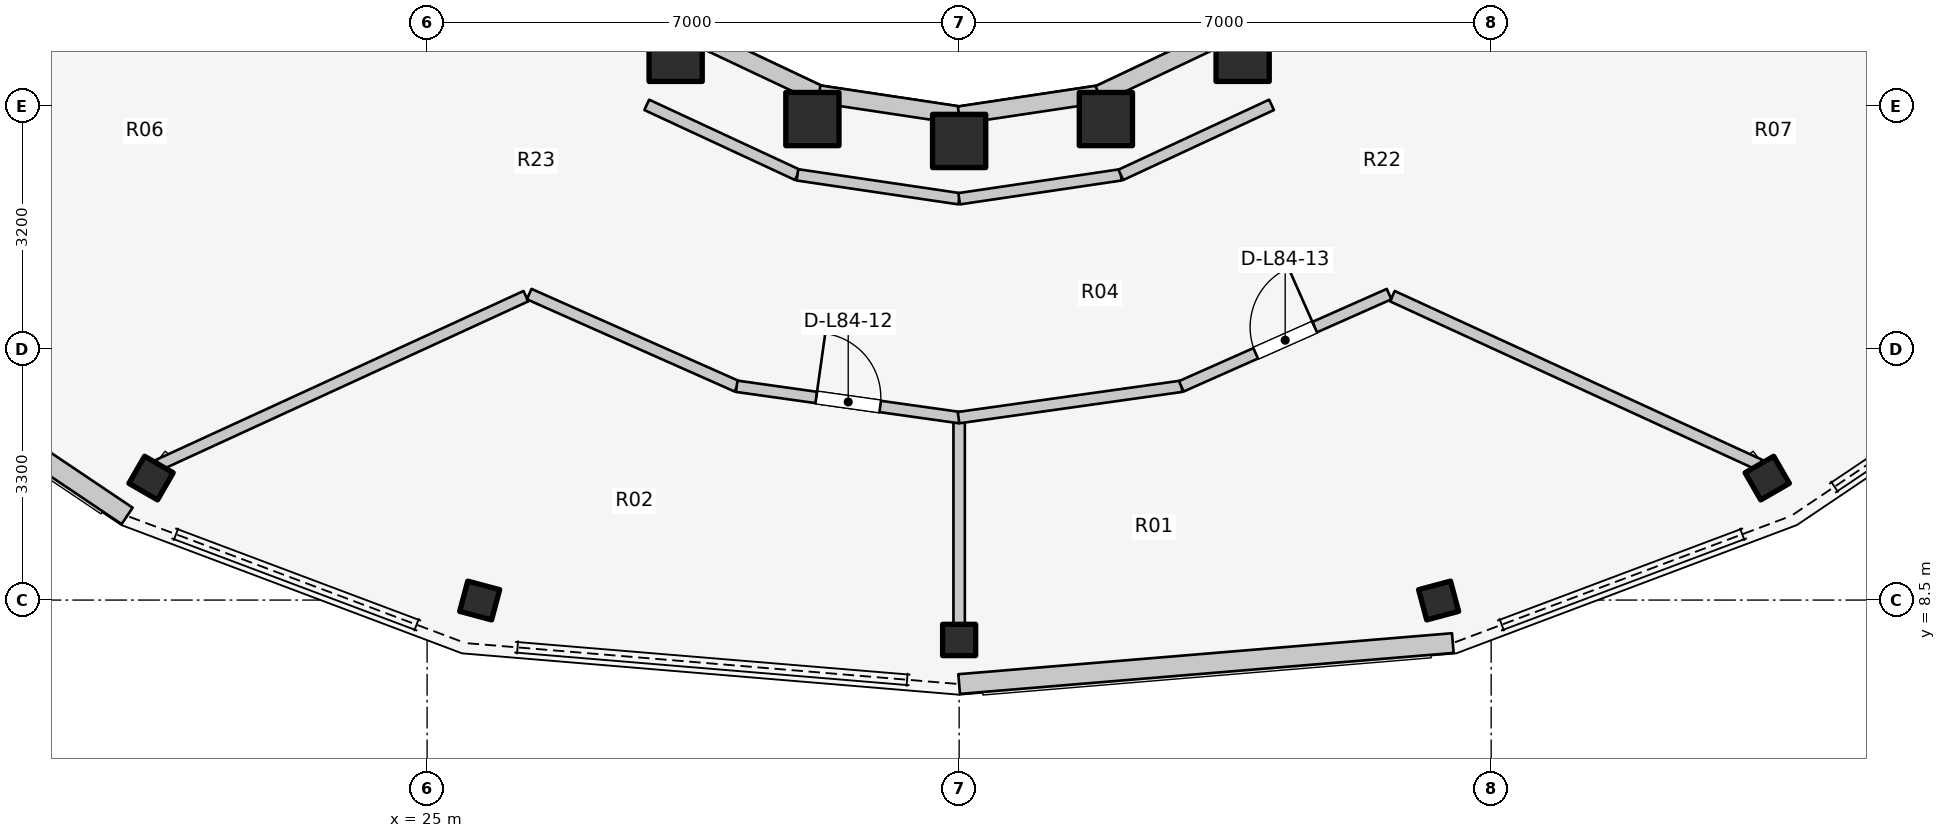
"""IFC4 building model, lengths in metres.
Left out: names, types, materials, properties, quantities, classifications, styles, units other than length and angle.
Written with IfcOpenShell. Run it as: python <this file> out.ifc"""

import sys

from ifc_helpers import new_model, si_unit, direction, frame, frame_2d, origin, origin_2d, place, context, subcontext, project, spatial, rectangle, i_section, extrude, element, fill, save


model = new_model("IFC4")
c1 = context("Model", 3, precision=1e-05, world=origin(), true_north=direction((0.0, 1.0)))
c2 = subcontext(c1, "Body", "Model", "MODEL_VIEW")
j1 = project(units=[si_unit("LENGTHUNIT", "METRE"), si_unit("PLANEANGLEUNIT", "RADIAN")], contexts=[c1])
p1 = place(None, origin())
s1 = spatial("IfcSite", under=j1, at=p1, CompositionType="ELEMENT")
p2 = place(p1, origin())
s2 = spatial("IfcBuilding", under=s1, at=p2, CompositionType="ELEMENT")
p3 = place(p2, frame((0.0, 0.0, 276.4)))
s3 = spatial("IfcBuildingStorey", under=s2, at=p3, CompositionType="ELEMENT", Elevation=276.4)
p4 = place(p3, frame((28.27, 15.673, 0.0), z_axis=(0.0, 0.0, 1.0), x_axis=(1.0, 0.0, 0.0)))
e1 = element("IfcColumn", 1, at=p4, inside=s3, PredefinedType="COLUMN", context=c2, shape_type="SweptSolid", body=[
    extrude(rectangle(XDim=0.7, YDim=0.7, at=origin_2d()), origin(), (0.0, 0.0, 1.0), 3.2),
])
p5 = place(p3, frame((21.368, 10.105, 0.0), z_axis=(0.0, 0.0, 1.0), x_axis=(-0.5, -0.866025403784, 0.0)))
e2 = element("IfcColumn", 2, at=p5, inside=s3, PredefinedType="COLUMN", context=c2, shape_type="SweptSolid", body=[
    extrude(i_section(OverallWidth=0.412, OverallDepth=0.435, WebThickness=0.036, FlangeThickness=0.057, FilletRadius=0.025, at=origin_2d()), origin(), (0.0, 0.0, 1.0), 3.2),
])
p6 = place(p3, frame((30.069, 14.828, 0.0), z_axis=(0.0, 0.0, 1.0), x_axis=(1.0, 0.0, 0.0)))
e3 = element("IfcColumn", 3, at=p6, inside=s3, PredefinedType="COLUMN", context=c2, shape_type="SweptSolid", body=[
    extrude(rectangle(XDim=0.7, YDim=0.7, at=origin_2d()), origin(), (0.0, 0.0, 1.0), 3.2),
])
p7 = place(p3, frame((25.692, 8.494, 0.0), z_axis=(0.0, 0.0, 1.0), x_axis=(-0.258819045103, -0.965925826289, 0.0)))
e4 = element("IfcColumn", 4, at=p7, inside=s3, PredefinedType="COLUMN", context=c2, shape_type="SweptSolid", body=[
    extrude(i_section(OverallWidth=0.412, OverallDepth=0.435, WebThickness=0.036, FlangeThickness=0.057, FilletRadius=0.025, at=origin_2d()), origin(), (0.0, 0.0, 1.0), 3.2),
])
p8 = place(p3, frame((32.0, 14.54, 0.0), z_axis=(0.0, 0.0, 1.0), x_axis=(1.0, 0.0, 0.0)))
e5 = element("IfcColumn", 5, at=p8, inside=s3, PredefinedType="COLUMN", context=c2, shape_type="SweptSolid", body=[
    extrude(rectangle(XDim=0.7, YDim=0.7, at=origin_2d()), origin(), (0.0, 0.0, 1.0), 3.2),
])
p9 = place(p3, frame((32.0, 7.975, 0.0), z_axis=(0.0, 0.0, 1.0), x_axis=(0.0, -1.0, 0.0)))
e6 = element("IfcColumn", 6, at=p9, inside=s3, PredefinedType="COLUMN", context=c2, shape_type="SweptSolid", body=[
    extrude(i_section(OverallWidth=0.412, OverallDepth=0.435, WebThickness=0.036, FlangeThickness=0.057, FilletRadius=0.025, at=origin_2d()), origin(), (0.0, 0.0, 1.0), 3.2),
])
p10 = place(p3, frame((33.931, 14.828, 0.0), z_axis=(0.0, 0.0, 1.0), x_axis=(1.0, 0.0, 0.0)))
e7 = element("IfcColumn", 7, at=p10, inside=s3, PredefinedType="COLUMN", context=c2, shape_type="SweptSolid", body=[
    extrude(rectangle(XDim=0.7, YDim=0.7, at=origin_2d()), origin(), (0.0, 0.0, 1.0), 3.2),
])
p11 = place(p3, frame((38.308, 8.494, 0.0), z_axis=(0.0, 0.0, 1.0), x_axis=(0.258819045103, -0.965925826289, 0.0)))
e8 = element("IfcColumn", 8, at=p11, inside=s3, PredefinedType="COLUMN", context=c2, shape_type="SweptSolid", body=[
    extrude(i_section(OverallWidth=0.412, OverallDepth=0.435, WebThickness=0.036, FlangeThickness=0.057, FilletRadius=0.025, at=origin_2d()), origin(), (0.0, 0.0, 1.0), 3.2),
])
p12 = place(p3, frame((35.73, 15.673, 0.0), z_axis=(0.0, 0.0, 1.0), x_axis=(1.0, 0.0, 0.0)))
e9 = element("IfcColumn", 9, at=p12, inside=s3, PredefinedType="COLUMN", context=c2, shape_type="SweptSolid", body=[
    extrude(rectangle(XDim=0.7, YDim=0.7, at=origin_2d()), origin(), (0.0, 0.0, 1.0), 3.2),
])
p13 = place(p3, frame((42.632, 10.105, 0.0), z_axis=(0.0, 0.0, 1.0), x_axis=(0.5, -0.866025403784, 0.0)))
e10 = element("IfcColumn", 10, at=p13, inside=s3, PredefinedType="COLUMN", context=c2, shape_type="SweptSolid", body=[
    extrude(i_section(OverallWidth=0.412, OverallDepth=0.435, WebThickness=0.036, FlangeThickness=0.057, FilletRadius=0.025, at=origin_2d()), origin(), (0.0, 0.0, 1.0), 3.2),
])
p14 = place(p3, frame((28.44, 15.968, 0.0), z_axis=(0.0, 0.0, 1.0), x_axis=(0.904179699603, -0.427152280606, 0.0)))
e11 = element("IfcWall", 11, at=p14, inside=s3, PredefinedType="STANDARD", context=c2, shape_type="SweptSolid", body=[
    extrude(rectangle(XDim=1.899, YDim=0.23, at=frame_2d((0.95, 0.0))), origin(), (0.0, 0.0, 1.0), 2.23),
])
for number, where, z_axis, x_axis in (
    (12, (30.157, 15.157, 0.0), (0.0, 0.0, 1.0), (0.989, -0.149, 0.0)),
    (13, (32.0, 14.88, 0.0), (0.0, 0.0, 1.0), (0.989, 0.149, 0.0)),
):
    element("IfcWall", number, at=place(p3, frame(where, z_axis=z_axis, x_axis=x_axis)), inside=s3, PredefinedType="STANDARD", context=c2, shape_type="SweptSolid", body=[
        extrude(rectangle(XDim=1.864, YDim=0.23, at=frame_2d((0.932, 0.0))), origin(), (0.0, 0.0, 1.0), 2.23),
    ])
p15 = place(p3, frame((33.843, 15.157, 0.0), z_axis=(0.0, 0.0, 1.0), x_axis=(0.904179699603, 0.427152280606, 0.0)))
e14 = element("IfcWall", 14, at=p15, inside=s3, PredefinedType="STANDARD", context=c2, shape_type="SweptSolid", body=[
    extrude(rectangle(XDim=1.899, YDim=0.23, at=frame_2d((0.95, 0.0))), origin(), (0.0, 0.0, 1.0), 2.23),
])
p16 = place(p3, frame((17.652, 11.894, 0.0), z_axis=(0.0, 0.0, 1.0), x_axis=(0.829890129343, -0.557926852929, 0.0)))
e15 = element("IfcWall", 15, at=p16, inside=s3, PredefinedType="STANDARD", context=c2, shape_type="SweptSolid", body=[
    extrude(rectangle(XDim=4.098, YDim=0.26, at=frame_2d((2.049, 0.0))), origin(), (0.0, 0.0, 1.0), 2.95),
])
p17 = place(p3, frame((32.0, 7.395, 0.0), z_axis=(0.0, 0.0, 1.0), x_axis=(0.996573859149, 0.082707576809, 0.0)))
e16 = element("IfcWall", 16, at=p17, inside=s3, PredefinedType="STANDARD", context=c2, shape_type="SweptSolid", body=[
    extrude(rectangle(XDim=6.518, YDim=0.26, at=frame_2d((3.259, 0.0))), origin(), (0.0, 0.0, 1.0), 2.95),
])
p18 = place(p3, frame((27.89, 15.015, 0.0), z_axis=(0.0, 0.0, 1.0), x_axis=(0.906943449489, -0.421252393975, 0.0)))
e17 = element("IfcWall", 17, at=p18, inside=s3, PredefinedType="PARTITIONING", context=c2, shape_type="SweptSolid", body=[
    extrude(rectangle(XDim=2.186, YDim=0.15, at=frame_2d((1.093, 0.0))), origin(), (0.0, 0.0, 1.0), 2.501),
])
for number, where, z_axis, x_axis in (
    (18, (29.873, 14.094, 0.0), (0.0, 0.0, 1.0), (0.989, -0.146, 0.0)),
    (19, (32.0, 13.78, 0.0), (0.0, 0.0, 1.0), (0.989, 0.146, 0.0)),
):
    element("IfcWall", number, at=place(p3, frame(where, z_axis=z_axis, x_axis=x_axis)), inside=s3, PredefinedType="PARTITIONING", context=c2, shape_type="SweptSolid", body=[
        extrude(rectangle(XDim=2.151, YDim=0.15, at=frame_2d((1.075, 0.0))), origin(), (0.0, 0.0, 1.0), 2.501),
    ])
p19 = place(p3, frame((34.127, 14.094, 0.0), z_axis=(0.0, 0.0, 1.0), x_axis=(0.906943449489, 0.421252393975, 0.0)))
e20 = element("IfcWall", 20, at=p19, inside=s3, PredefinedType="PARTITIONING", context=c2, shape_type="SweptSolid", body=[
    extrude(rectangle(XDim=2.186, YDim=0.15, at=frame_2d((1.093, 0.0))), origin(), (0.0, 0.0, 1.0), 2.501),
])
p20 = place(p3, frame((26.3, 12.498, 0.0), z_axis=(0.0, 0.0, 1.0), x_axis=(-0.908705087361, -0.417438695144, 0.0)))
e21 = element("IfcWall", 21, at=p20, inside=s3, PredefinedType="PARTITIONING", context=c2, shape_type="SweptSolid", body=[
    extrude(rectangle(XDim=5.317, YDim=0.15, at=frame_2d((2.659, 0.0))), origin(), (0.0, 0.0, 1.0), 2.455),
])
p21 = place(p3, frame((32.0, 10.845, 0.0), z_axis=(0.0, 0.0, 1.0), x_axis=(0.0, -1.0, 0.0)))
e22 = element("IfcWall", 22, at=p21, inside=s3, PredefinedType="PARTITIONING", context=c2, shape_type="SweptSolid", body=[
    extrude(rectangle(XDim=2.67, YDim=0.15, at=frame_2d((1.335, 0.0))), origin(), (0.0, 0.0, 1.0), 2.501),
])
p22 = place(p3, frame((37.7, 12.498, 0.0), z_axis=(0.0, 0.0, 1.0), x_axis=(0.908705087361, -0.417438695144, 0.0)))
e23 = element("IfcWall", 23, at=p22, inside=s3, PredefinedType="PARTITIONING", context=c2, shape_type="SweptSolid", body=[
    extrude(rectangle(XDim=5.317, YDim=0.15, at=frame_2d((2.659, 0.0))), origin(), (0.0, 0.0, 1.0), 2.455),
])
p23 = place(p3, frame((26.343, 12.525, 0.0), z_axis=(0.0, 0.0, 1.0), x_axis=(0.913989848226, -0.405737054432, 0.0)))
e24 = element("IfcWall", 24, at=p23, inside=s3, PredefinedType="PARTITIONING", context=c2, shape_type="SweptSolid", body=[
    extrude(rectangle(XDim=2.991, YDim=0.15, at=frame_2d((1.496, 0.0))), origin(), (0.0, 0.0, 1.0), 2.455),
])
p24 = place(p3, frame((29.073, 11.313, 0.0), z_axis=(0.0, 0.0, 1.0), x_axis=(0.990247167887, -0.139321737324, 0.0)))
e25 = element("IfcWall", 25, at=p24, inside=s3, PredefinedType="PARTITIONING", context=c2, shape_type="SweptSolid", body=[
    extrude(rectangle(XDim=2.963, YDim=0.15, at=frame_2d((1.481, 0.0))), origin(), (0.0, 0.0, 1.0), 2.455),
])
p25 = place(p24, frame((1.057, 0.0, 0.0)))
e26 = element("IfcOpeningElement", 26, at=p25, cuts=e25, PredefinedType="OPENING", context=c2, shape_type="SweptSolid", body=[
    extrude(rectangle(XDim=0.85, YDim=2.05, at=frame_2d((0.425, 1.025))), frame((0.0, 0.085, 0.0), z_axis=(0.0, -1.0, 0.0), x_axis=(1.0, 0.0, 0.0)), (0.0, 0.0, 1.0), 0.17),
])
p26 = place(p3, frame((31.992, 10.9, 0.0), z_axis=(0.0, 0.0, 1.0), x_axis=(0.990247167887, 0.139321737324, 0.0)))
e27 = element("IfcWall", 27, at=p26, inside=s3, PredefinedType="PARTITIONING", context=c2, shape_type="SweptSolid", body=[
    extrude(rectangle(XDim=2.963, YDim=0.15, at=frame_2d((1.481, 0.0))), origin(), (0.0, 0.0, 1.0), 2.455),
])
p27 = place(p3, frame((34.923, 11.312, 0.0), z_axis=(0.0, 0.0, 1.0), x_axis=(0.913989848226, 0.405737054432, 0.0)))
e28 = element("IfcWall", 28, at=p27, inside=s3, PredefinedType="PARTITIONING", context=c2, shape_type="SweptSolid", body=[
    extrude(rectangle(XDim=2.991, YDim=0.15, at=frame_2d((1.496, 0.0))), origin(), (0.0, 0.0, 1.0), 2.455),
])
p28 = place(p27, frame((1.071, 0.0, 0.0)))
e29 = element("IfcOpeningElement", 29, at=p28, cuts=e28, PredefinedType="OPENING", context=c2, shape_type="SweptSolid", body=[
    extrude(rectangle(XDim=0.85, YDim=2.05, at=frame_2d((0.425, 1.025))), frame((0.0, 0.085, 0.0), z_axis=(0.0, -1.0, 0.0), x_axis=(1.0, 0.0, 0.0)), (0.0, 0.0, 1.0), 0.17),
])
p29 = place(p25, origin())
e30 = element("IfcDoor", 30, at=p29, inside=s3, OperationType="SINGLE_SWING_LEFT", PredefinedType="DOOR", context=c2, shape_type="SweptSolid", body=[
    extrude(rectangle(XDim=0.85, YDim=2.05, at=frame_2d((0.425, 1.025))), frame((0.0, 0.025, 0.0), z_axis=(0.0, -1.0, 0.0), x_axis=(1.0, 0.0, 0.0)), (0.0, 0.0, 1.0), 0.05),
])
fill(e26, e30)
p30 = place(p28, origin())
e31 = element("IfcDoor", 31, at=p30, inside=s3, OperationType="SINGLE_SWING_RIGHT", PredefinedType="DOOR", context=c2, shape_type="SweptSolid", body=[
    extrude(rectangle(XDim=0.85, YDim=2.05, at=frame_2d((0.425, 1.025))), frame((0.0, 0.025, 0.0), z_axis=(0.0, -1.0, 0.0), x_axis=(1.0, 0.0, 0.0)), (0.0, 0.0, 1.0), 0.05),
])
fill(e29, e31)
save(model, sys.argv[1])
